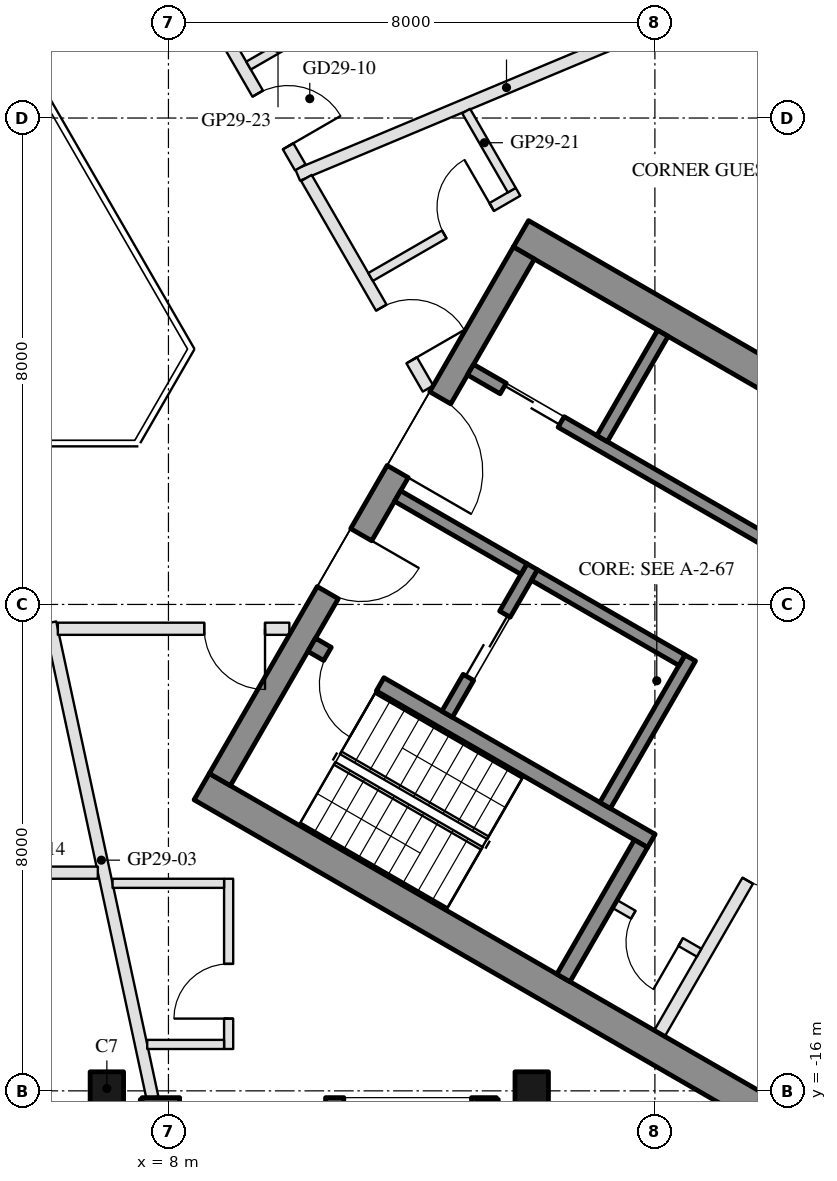
"""IFC4 building model, lengths in metres.
Left out: names, types, materials, properties, quantities, classifications, styles, units other than length and angle.
Written with IfcOpenShell. Run it as: python <this file> out.ifc"""

import sys

from ifc_helpers import new_model, si_unit, direction, frame, frame_2d, origin, origin_2d, place, context, subcontext, project, spatial, rectangle, hollow_rectangle, extrude, boolean, halfspace, element, fill, save


model = new_model("IFC4")
c1 = context("Model", 3, precision=1e-05, world=origin(), true_north=direction((0.0, 1.0)))
c2 = subcontext(c1, "Body", "Model", "MODEL_VIEW")
j1 = project(units=[si_unit("LENGTHUNIT", "METRE"), si_unit("PLANEANGLEUNIT", "RADIAN")], contexts=[c1])
p1 = place(None, origin())
s1 = spatial("IfcSite", under=j1, at=p1, CompositionType="ELEMENT")
p2 = place(p1, origin())
s2 = spatial("IfcBuilding", under=s1, at=p2, CompositionType="ELEMENT")
p3 = place(p2, frame((0.0, 0.0, 291.1)))
s3 = spatial("IfcBuildingStorey", under=s2, at=p3, CompositionType="ELEMENT", Elevation=291.1)
p4 = place(p3, frame((6.987, -15.962, 0.0), z_axis=(0.0, 0.0, 1.0), x_axis=(-1.0, 0.0, 0.0)))
e1 = element("IfcColumn", 1, at=p4, inside=s3, PredefinedType="COLUMN", context=c2, shape_type="SweptSolid", body=[
    boolean("DIFFERENCE", extrude(hollow_rectangle(XDim=0.55, YDim=0.55, WallThickness=0.025, at=origin_2d()), origin(), (0.0, 0.0, 1.0), 3.7), halfspace(frame((0.0, 0.0, 0.034), z_axis=(0.0, 0.0, 1.0), x_axis=(1.0, 0.0, 0.0)), True)),
])
p5 = place(p3, frame((13.974, -15.962, 0.0), z_axis=(0.0, 0.0, 1.0), x_axis=(-1.0, 0.0, 0.0)))
e2 = element("IfcColumn", 2, at=p5, inside=s3, PredefinedType="COLUMN", context=c2, shape_type="SweptSolid", body=[
    boolean("DIFFERENCE", extrude(hollow_rectangle(XDim=0.55, YDim=0.55, WallThickness=0.025, at=origin_2d()), origin(), (0.0, 0.0, 1.0), 3.7), halfspace(frame((0.0, 0.0, 0.04), z_axis=(0.0, 0.0, 1.0), x_axis=(1.0, 0.0, 0.0)), True)),
])
p6 = place(p3, frame((7.712, -17.362, 0.0), z_axis=(0.0, 0.0, 1.0), x_axis=(0.0, 1.0, 0.0)))
e3 = element("IfcWall", 3, at=p6, inside=s3, PredefinedType="SOLIDWALL", context=c2, shape_type="SweptSolid", body=[
    extrude(rectangle(XDim=1.22, YDim=0.35, at=frame_2d((0.61, 0.0))), origin(), (0.0, 0.0, 1.0), 3.55),
])
p7 = place(p3, frame((7.567, -16.287, 0.0), z_axis=(0.0, 0.0, 1.0), x_axis=(1.0, 0.0, 0.0)))
e4 = element("IfcWall", 4, at=p7, inside=s3, PredefinedType="SOLIDWALL", context=c2, shape_type="SweptSolid", body=[
    extrude(rectangle(XDim=5.827, YDim=0.35, at=frame_2d((2.914, 0.0))), origin(), (0.0, 0.0, 1.0), 3.55),
])
p8 = place(p7, frame((0.617, 0.0, 0.0)))
e5 = element("IfcOpeningElement", 5, at=p8, cuts=e4, PredefinedType="OPENING", context=c2, shape_type="SweptSolid", body=[
    extrude(rectangle(XDim=2.4, YDim=2.4, at=frame_2d((1.2, 1.2))), frame((0.0, 0.185, 0.0), z_axis=(0.0, -1.0, 0.0), x_axis=(1.0, 0.0, 0.0)), (0.0, 0.0, 1.0), 0.37),
])
p9 = place(p7, frame((3.317, 0.0, 0.3)))
e6 = element("IfcOpeningElement", 6, at=p9, cuts=e4, PredefinedType="OPENING", context=c2, shape_type="SweptSolid", body=[
    extrude(rectangle(XDim=2.1, YDim=2.65, at=frame_2d((1.05, 1.325))), frame((0.0, 0.185, 0.0), z_axis=(0.0, -1.0, 0.0), x_axis=(1.0, 0.0, 0.0)), (0.0, 0.0, 1.0), 0.37),
])
p10 = place(p3, frame((13.249, -16.142, 0.0), z_axis=(0.0, 0.0, 1.0), x_axis=(0.0, -1.0, 0.0)))
e7 = element("IfcWall", 7, at=p10, inside=s3, PredefinedType="SOLIDWALL", context=c2, shape_type="SweptSolid", body=[
    extrude(rectangle(XDim=1.22, YDim=0.35, at=frame_2d((0.61, 0.0))), origin(), (0.0, 0.0, 1.0), 3.55),
])
for number, where, z_axis, x_axis in (
    (8, (8.547, -10.997, 0.0), (0.0, 0.0, 1.0), (0.866, -0.5, 0.0)),
    (9, (13.797, -1.903, 0.0), (0.0, 0.0, 1.0), (0.866, -0.5, 0.0)),
):
    element("IfcWall", number, at=place(p3, frame(where, z_axis=z_axis, x_axis=x_axis)), inside=s3, PredefinedType="SHEAR", context=c2, shape_type="SweptSolid", body=[
        extrude(rectangle(XDim=11.222, YDim=0.5, at=frame_2d((5.611, 0.0))), origin(), (0.0, 0.0, 1.0), 3.5),
    ])
p11 = place(p3, frame((8.845, -10.88, 0.0), z_axis=(0.0, 0.0, 1.0), x_axis=(0.500004234368, 0.866022959057, 0.0)))
e10 = element("IfcWall", 10, at=p11, inside=s3, PredefinedType="SHEAR", context=c2, shape_type="SweptSolid", body=[
    extrude(rectangle(XDim=10.0, YDim=0.4, at=frame_2d((5.0, 0.0))), origin(), (0.0, 0.0, 1.0), 3.5),
])
p12 = place(p11, frame((3.55, 0.0, 0.0)))
e11 = element("IfcOpeningElement", 11, at=p12, cuts=e10, PredefinedType="OPENING", context=c2, shape_type="SweptSolid", body=[
    extrude(rectangle(XDim=1.1, YDim=2.1, at=frame_2d((0.55, 1.05))), frame((0.0, 0.21, 0.0), z_axis=(0.0, -1.0, 0.0), x_axis=(1.0, 0.0, 0.0)), (0.0, 0.0, 1.0), 0.42),
])
p13 = place(p11, frame((5.85, 0.0, 0.0)))
e12 = element("IfcOpeningElement", 12, at=p13, cuts=e10, PredefinedType="OPENING", context=c2, shape_type="SweptSolid", body=[
    extrude(rectangle(XDim=1.4, YDim=2.1, at=frame_2d((0.7, 1.05))), frame((0.0, 0.21, 0.0), z_axis=(0.0, -1.0, 0.0), x_axis=(1.0, 0.0, 0.0)), (0.0, 0.0, 1.0), 0.42),
])
p14 = place(p3, frame((10.356, -8.664, 0.0), z_axis=(0.0, 0.0, 1.0), x_axis=(0.866028629588, -0.499994412703, 0.0)))
e13 = element("IfcWall", 13, at=p14, inside=s3, PredefinedType="SHEAR", context=c2, shape_type="SweptSolid", body=[
    extrude(rectangle(XDim=6.45, YDim=0.25, at=frame_2d((3.225, 0.0))), origin(), (0.0, 0.0, 1.0), 3.5),
])
p15 = place(p14, frame((0.3, 0.0, 0.0)))
e14 = element("IfcOpeningElement", 14, at=p15, cuts=e13, PredefinedType="OPENING", context=c2, shape_type="SweptSolid", body=[
    extrude(rectangle(XDim=1.0, YDim=2.1, at=frame_2d((0.5, 1.05))), frame((0.0, 0.135, 0.0), z_axis=(0.0, -1.0, 0.0), x_axis=(1.0, 0.0, 0.0)), (0.0, 0.0, 1.0), 0.27),
])
p16 = place(p3, frame((14.496, -14.143, 0.0), z_axis=(0.0, 0.0, 1.0), x_axis=(0.500062241894, 0.865989465428, 0.0)))
e15 = element("IfcWall", 15, at=p16, inside=s3, PredefinedType="SHEAR", context=c2, shape_type="SweptSolid", body=[
    extrude(rectangle(XDim=2.55, YDim=0.25, at=frame_2d((1.275, 0.0))), origin(), (0.0, 0.0, 1.0), 3.5),
])
p17 = place(p3, frame((15.181, -11.305, 0.0), z_axis=(0.0, 0.0, 1.0), x_axis=(0.49994636267, 0.866056369097, 0.0)))
e16 = element("IfcWall", 16, at=p17, inside=s3, PredefinedType="SHEAR", context=c2, shape_type="SweptSolid", body=[
    extrude(rectangle(XDim=2.8, YDim=0.2, at=frame_2d((1.4, 0.0))), origin(), (0.0, 0.0, 1.0), 3.5),
])
p18 = place(p3, frame((12.583, -9.805, 0.0), z_axis=(0.0, 0.0, 1.0), x_axis=(0.49994636267, 0.866056369097, 0.0)))
e17 = element("IfcWall", 17, at=p18, inside=s3, PredefinedType="SHEAR", context=c2, shape_type="SweptSolid", body=[
    extrude(rectangle(XDim=2.8, YDim=0.2, at=frame_2d((1.4, 0.0))), origin(), (0.0, 0.0, 1.0), 3.5),
])
p19 = place(p18, frame((0.7, 0.0, 0.0)))
e18 = element("IfcOpeningElement", 18, at=p19, cuts=e17, PredefinedType="OPENING", context=c2, shape_type="SweptSolid", body=[
    extrude(rectangle(XDim=1.2, YDim=2.1, at=frame_2d((0.6, 1.05))), frame((0.0, 0.11, 0.0), z_axis=(0.0, -1.0, 0.0), x_axis=(1.0, 0.0, 0.0)), (0.0, 0.0, 1.0), 0.22),
])
p20 = place(p3, frame((11.768, -6.217, 0.0), z_axis=(0.0, 0.0, 1.0), x_axis=(0.866050077142, -0.499957262057, 0.0)))
e19 = element("IfcWall", 19, at=p20, inside=s3, PredefinedType="SHEAR", context=c2, shape_type="SweptSolid", body=[
    extrude(rectangle(XDim=2.4, YDim=0.2, at=frame_2d((1.2, 0.0))), origin(), (0.0, 0.0, 1.0), 3.5),
])
p21 = place(p3, frame((14.02, -7.517, 0.0), z_axis=(0.0, 0.0, 1.0), x_axis=(0.866034573852, -0.49998411664, 0.0)))
e20 = element("IfcWall", 20, at=p21, inside=s3, PredefinedType="SHEAR", context=c2, shape_type="SweptSolid", body=[
    extrude(rectangle(XDim=2.8, YDim=0.2, at=frame_2d((1.4, 0.0))), origin(), (0.0, 0.0, 1.0), 3.5),
])
p22 = place(p3, frame((12.968, -4.138, 0.0), z_axis=(0.0, 0.0, 1.0), x_axis=(0.866028328073, -0.49999493495, 0.0)))
e21 = element("IfcWall", 21, at=p22, inside=s3, PredefinedType="SHEAR", context=c2, shape_type="SweptSolid", body=[
    extrude(rectangle(XDim=10.16, YDim=0.2, at=frame_2d((5.08, 0.0))), origin(), (0.0, 0.0, 1.0), 3.5),
])
p23 = place(p22, frame((0.62, 0.0, 0.0)))
e22 = element("IfcOpeningElement", 22, at=p23, cuts=e21, PredefinedType="OPENING", context=c2, shape_type="SweptSolid", body=[
    extrude(rectangle(XDim=1.1, YDim=2.1, at=frame_2d((0.55, 1.05))), frame((0.0, 0.11, 0.0), z_axis=(0.0, -1.0, 0.0), x_axis=(1.0, 0.0, 0.0)), (0.0, 0.0, 1.0), 0.22),
])
p24 = place(p22, frame((5.8, 0.0, 0.0)))
e23 = element("IfcOpeningElement", 23, at=p24, cuts=e21, PredefinedType="OPENING", context=c2, shape_type="SweptSolid", body=[
    extrude(rectangle(XDim=0.9, YDim=2.1, at=frame_2d((0.45, 1.05))), frame((0.0, 0.11, 0.0), z_axis=(0.0, -1.0, 0.0), x_axis=(1.0, 0.0, 0.0)), (0.0, 0.0, 1.0), 0.22),
])
p25 = place(p3, frame((15.131, -5.272, 0.0), z_axis=(0.0, 0.0, 1.0), x_axis=(0.499972520799, 0.866041268327, 0.0)))
e24 = element("IfcWall", 24, at=p25, inside=s3, PredefinedType="SHEAR", context=c2, shape_type="SweptSolid", body=[
    extrude(rectangle(XDim=2.0, YDim=0.2, at=frame_2d((1.0, 0.0))), origin(), (0.0, 0.0, 1.0), 3.5),
])
p26 = place(p3, frame((16.076, -15.055, 0.0), z_axis=(0.0, 0.0, 1.0), x_axis=(0.499995103361, 0.866028230842, 0.0)))
e25 = element("IfcWall", 25, at=p26, inside=s3, PredefinedType="PARTITIONING", context=c2, shape_type="SweptSolid", body=[
    extrude(rectangle(XDim=5.4, YDim=0.2, at=frame_2d((2.7, 0.0))), origin(), (0.0, 0.0, 1.0), 3.5),
])
p27 = place(p26, frame((2.9, 0.0, 0.0)))
e26 = element("IfcOpeningElement", 26, at=p27, cuts=e25, PredefinedType="OPENING", context=c2, shape_type="SweptSolid", body=[
    extrude(rectangle(XDim=0.9, YDim=2.1, at=frame_2d((0.45, 1.05))), frame((0.0, 0.11, 0.0), z_axis=(0.0, -1.0, 0.0), x_axis=(1.0, 0.0, 0.0)), (0.0, 0.0, 1.0), 0.22),
])
p28 = place(p3, frame((15.342, -12.928, 0.0), z_axis=(0.0, 0.0, 1.0), x_axis=(0.865989903783, -0.500061482766, 0.0)))
e27 = element("IfcWall", 27, at=p28, inside=s3, PredefinedType="PARTITIONING", context=c2, shape_type="SweptSolid", body=[
    extrude(rectangle(XDim=1.6, YDim=0.15, at=frame_2d((0.8, 0.0))), origin(), (0.0, 0.0, 1.0), 3.5),
])
p29 = place(p28, frame((0.35, 0.0, 0.0)))
e28 = element("IfcOpeningElement", 28, at=p29, cuts=e27, PredefinedType="OPENING", context=c2, shape_type="SweptSolid", body=[
    extrude(rectangle(XDim=0.9, YDim=2.1, at=frame_2d((0.45, 1.05))), frame((0.0, 0.085, 0.0), z_axis=(0.0, -1.0, 0.0), x_axis=(1.0, 0.0, 0.0)), (0.0, 0.0, 1.0), 0.17),
])
p30 = place(p3, frame((7.737, -16.112, 0.0), z_axis=(0.0, 0.0, 1.0), x_axis=(-0.210221826162, 0.977653713646, 0.0)))
e29 = element("IfcWall", 29, at=p30, inside=s3, PredefinedType="PARTITIONING", context=c2, shape_type="SweptSolid", body=[
    extrude(rectangle(XDim=7.99, YDim=0.2, at=frame_2d((3.995, 0.0))), origin(), (0.0, 0.0, 1.0), 3.05),
])
p31 = place(p3, frame((16.994, 1.939, 0.0), z_axis=(0.0, 0.0, 1.0), x_axis=(-0.922394541425, -0.386249025824, 0.0)))
e30 = element("IfcWall", 30, at=p31, inside=s3, PredefinedType="PARTITIONING", context=c2, shape_type="SweptSolid", body=[
    extrude(rectangle(XDim=7.447, YDim=0.2, at=frame_2d((3.723, 0.0))), origin(), (0.0, 0.0, 1.0), 3.05),
])
p32 = place(p3, frame((6.839, -12.412, 0.0), z_axis=(0.0, 0.0, 1.0), x_axis=(-1.0, 0.0, 0.0)))
e31 = element("IfcWall", 31, at=p32, inside=s3, PredefinedType="PARTITIONING", context=c2, shape_type="SweptSolid", body=[
    extrude(rectangle(XDim=5.539, YDim=0.2, at=frame_2d((2.769, 0.0))), origin(), (0.0, 0.0, 1.0), 3.05),
])
p33 = place(p32, frame((2.269, 0.0, 0.0)))
e32 = element("IfcOpeningElement", 32, at=p33, cuts=e31, PredefinedType="OPENING", context=c2, shape_type="SweptSolid", body=[
    extrude(rectangle(XDim=1.0, YDim=2.1, at=frame_2d((0.5, 1.05))), frame((0.0, 0.11, 0.0), z_axis=(0.0, -1.0, 0.0), x_axis=(1.0, 0.0, 0.0)), (0.0, 0.0, 1.0), 0.22),
])
p34 = place(p3, frame((9.988, -8.4, 0.0), z_axis=(0.0, 0.0, 1.0), x_axis=(-1.0, 0.0, 0.0)))
e33 = element("IfcWall", 33, at=p34, inside=s3, PredefinedType="PARTITIONING", context=c2, shape_type="SweptSolid", body=[
    extrude(rectangle(XDim=3.807, YDim=0.2, at=frame_2d((1.904, 0.0))), origin(), (0.0, 0.0, 1.0), 3.05),
])
p35 = place(p34, frame((0.4, 0.0, 0.0)))
e34 = element("IfcOpeningElement", 34, at=p35, cuts=e33, PredefinedType="OPENING", context=c2, shape_type="SweptSolid", body=[
    extrude(rectangle(XDim=1.0, YDim=2.1, at=frame_2d((0.5, 1.05))), frame((0.0, 0.11, 0.0), z_axis=(0.0, -1.0, 0.0), x_axis=(1.0, 0.0, 0.0)), (0.0, 0.0, 1.0), 0.22),
])
p36 = place(p3, frame((8.99, -15.312, 0.0), z_axis=(0.0, 0.0, 1.0), x_axis=(0.0, 1.0, 0.0)))
e35 = element("IfcWall", 35, at=p36, inside=s3, PredefinedType="PARTITIONING", context=c2, shape_type="SweptSolid", body=[
    extrude(rectangle(XDim=2.8, YDim=0.15, at=frame_2d((1.4, 0.0))), origin(), (0.0, 0.0, 1.0), 3.55),
])
p37 = place(p36, frame((0.5, 0.0, 0.0)))
e36 = element("IfcOpeningElement", 36, at=p37, cuts=e35, PredefinedType="OPENING", context=c2, shape_type="SweptSolid", body=[
    extrude(rectangle(XDim=0.9, YDim=2.1, at=frame_2d((0.45, 1.05))), frame((0.0, 0.085, 0.0), z_axis=(0.0, -1.0, 0.0), x_axis=(1.0, 0.0, 0.0)), (0.0, 0.0, 1.0), 0.17),
])
p38 = place(p3, frame((7.651, -15.237, 0.0), z_axis=(0.0, 0.0, 1.0), x_axis=(1.0, 0.0, 0.0)))
e37 = element("IfcWall", 37, at=p38, inside=s3, PredefinedType="PARTITIONING", context=c2, shape_type="SweptSolid", body=[
    extrude(rectangle(XDim=1.264, YDim=0.15, at=frame_2d((0.632, 0.0))), origin(), (0.0, 0.0, 1.0), 3.55),
])
p39 = place(p3, frame((7.081, -12.587, 0.0), z_axis=(0.0, 0.0, 1.0), x_axis=(1.0, 0.0, 0.0)))
e38 = element("IfcWall", 38, at=p39, inside=s3, PredefinedType="PARTITIONING", context=c2, shape_type="SweptSolid", body=[
    extrude(rectangle(XDim=1.834, YDim=0.15, at=frame_2d((0.917, 0.0))), origin(), (0.0, 0.0, 1.0), 3.05),
])
p40 = place(p3, frame((10.269, -0.986, 0.0), z_axis=(0.0, 0.0, 1.0), x_axis=(0.50004472278, -0.865999581536, 0.0)))
e39 = element("IfcWall", 39, at=p40, inside=s3, PredefinedType="PARTITIONING", context=c2, shape_type="SweptSolid", body=[
    extrude(rectangle(XDim=4.0, YDim=0.2, at=frame_2d((2.0, 0.0))), origin(), (0.0, 0.0, 1.0), 3.05),
])
p41 = place(p40, frame((2.463, 0.0, 0.0)))
e40 = element("IfcOpeningElement", 40, at=p41, cuts=e39, PredefinedType="OPENING", context=c2, shape_type="SweptSolid", body=[
    extrude(rectangle(XDim=1.0, YDim=2.1, at=frame_2d((0.5, 1.05))), frame((0.0, 0.11, 0.0), z_axis=(0.0, -1.0, 0.0), x_axis=(1.0, 0.0, 0.0)), (0.0, 0.0, 1.0), 0.22),
])
p42 = place(p3, frame((11.324, -2.614, 0.0), z_axis=(0.0, 0.0, 1.0), x_axis=(0.866034573852, 0.49998411664, 0.0)))
e41 = element("IfcWall", 41, at=p42, inside=s3, PredefinedType="PARTITIONING", context=c2, shape_type="SweptSolid", body=[
    extrude(rectangle(XDim=2.8, YDim=0.15, at=frame_2d((1.4, 0.0))), origin(), (0.0, 0.0, 1.0), 3.55),
])
p43 = place(p42, frame((1.4, 0.0, 0.0)))
e42 = element("IfcOpeningElement", 42, at=p43, cuts=e41, PredefinedType="OPENING", context=c2, shape_type="SweptSolid", body=[
    extrude(rectangle(XDim=0.9, YDim=2.1, at=frame_2d((0.45, 1.05))), frame((0.0, 0.085, 0.0), z_axis=(0.0, -1.0, 0.0), x_axis=(1.0, 0.0, 0.0)), (0.0, 0.0, 1.0), 0.17),
])
p44 = place(p3, frame((13.646, -1.187, 0.0), z_axis=(0.0, 0.0, 1.0), x_axis=(-0.499985098601, 0.86603400694, 0.0)))
e43 = element("IfcWall", 43, at=p44, inside=s3, PredefinedType="PARTITIONING", context=c2, shape_type="SweptSolid", body=[
    extrude(rectangle(XDim=1.502, YDim=0.15, at=frame_2d((0.751, 0.0))), origin(), (0.0, 0.0, 1.0), 3.05),
])
p45 = place(p3, frame((8.325, 2.381, 0.0), z_axis=(0.0, 0.0, 1.0), x_axis=(0.499949858301, -0.866054351173, 0.0)))
e44 = element("IfcWall", 44, at=p45, inside=s3, PredefinedType="PARTITIONING", context=c2, shape_type="SweptSolid", body=[
    extrude(rectangle(XDim=3.687, YDim=0.2, at=frame_2d((1.843, 0.0))), origin(), (0.0, 0.0, 1.0), 3.05),
])
p46 = place(p45, frame((2.286, 0.0, 0.0)))
e45 = element("IfcOpeningElement", 45, at=p46, cuts=e44, PredefinedType="OPENING", context=c2, shape_type="SweptSolid", body=[
    extrude(rectangle(XDim=1.0, YDim=2.1, at=frame_2d((0.5, 1.05))), frame((0.0, 0.11, 0.0), z_axis=(0.0, -1.0, 0.0), x_axis=(1.0, 0.0, 0.0)), (0.0, 0.0, 1.0), 0.22),
])
p47 = place(p3, frame((9.317, 0.863, 0.0), z_axis=(0.0, 0.0, 1.0), x_axis=(0.865996816683, 0.500049511043, 0.0)))
e46 = element("IfcWall", 46, at=p47, inside=s3, PredefinedType="PARTITIONING", context=c2, shape_type="SweptSolid", body=[
    extrude(rectangle(XDim=2.8, YDim=0.15, at=frame_2d((1.4, 0.0))), origin(), (0.0, 0.0, 1.0), 3.55),
])
p48 = place(p47, frame((1.4, 0.0, 0.0)))
e47 = element("IfcOpeningElement", 47, at=p48, cuts=e46, PredefinedType="OPENING", context=c2, shape_type="SweptSolid", body=[
    extrude(rectangle(XDim=0.9, YDim=2.1, at=frame_2d((0.45, 1.05))), frame((0.0, 0.085, 0.0), z_axis=(0.0, -1.0, 0.0), x_axis=(1.0, 0.0, 0.0)), (0.0, 0.0, 1.0), 0.17),
])
p49 = place(p19, origin())
e48 = element("IfcDoor", 48, at=p49, inside=s3, OperationType="DOUBLE_DOOR_SLIDING", PredefinedType="DOOR", context=c2, shape_type="SweptSolid", body=[
    extrude(rectangle(XDim=1.2, YDim=2.1, at=frame_2d((0.6, 1.05))), frame((0.0, 0.025, 0.0), z_axis=(0.0, -1.0, 0.0), x_axis=(1.0, 0.0, 0.0)), (0.0, 0.0, 1.0), 0.05),
])
fill(e18, e48)
p50 = place(p29, frame((0.9, 0.0, 0.0), z_axis=(0.0, 0.0, 1.0), x_axis=(-1.0, 0.0, 0.0)))
e49 = element("IfcDoor", 49, at=p50, inside=s3, OperationType="SINGLE_SWING_LEFT", PredefinedType="DOOR", context=c2, shape_type="SweptSolid", body=[
    extrude(rectangle(XDim=0.9, YDim=2.1, at=frame_2d((0.45, 1.05))), frame((0.0, 0.025, 0.0), z_axis=(0.0, -1.0, 0.0), x_axis=(1.0, 0.0, 0.0)), (0.0, 0.0, 1.0), 0.05),
])
fill(e28, e49)
p51 = place(p23, origin())
e50 = element("IfcDoor", 50, at=p51, inside=s3, OperationType="DOUBLE_DOOR_SLIDING", PredefinedType="DOOR", context=c2, shape_type="SweptSolid", body=[
    extrude(rectangle(XDim=1.1, YDim=2.1, at=frame_2d((0.55, 1.05))), frame((0.0, 0.025, 0.0), z_axis=(0.0, -1.0, 0.0), x_axis=(1.0, 0.0, 0.0)), (0.0, 0.0, 1.0), 0.05),
])
fill(e22, e50)
p52 = place(p27, frame((0.9, 0.0, 0.0), z_axis=(0.0, 0.0, 1.0), x_axis=(-1.0, 0.0, 0.0)))
e51 = element("IfcDoor", 51, at=p52, inside=s3, OperationType="SINGLE_SWING_LEFT", PredefinedType="DOOR", context=c2, shape_type="SweptSolid", body=[
    extrude(rectangle(XDim=0.9, YDim=2.1, at=frame_2d((0.45, 1.05))), frame((0.0, 0.025, 0.0), z_axis=(0.0, -1.0, 0.0), x_axis=(1.0, 0.0, 0.0)), (0.0, 0.0, 1.0), 0.05),
])
fill(e26, e51)
p53 = place(p12, frame((1.1, 0.0, 0.0), z_axis=(0.0, 0.0, 1.0), x_axis=(-1.0, 0.0, 0.0)))
e52 = element("IfcDoor", 52, at=p53, inside=s3, OperationType="SINGLE_SWING_LEFT", PredefinedType="DOOR", context=c2, shape_type="SweptSolid", body=[
    extrude(rectangle(XDim=1.1, YDim=2.1, at=frame_2d((0.55, 1.05))), frame((0.0, 0.025, 0.0), z_axis=(0.0, -1.0, 0.0), x_axis=(1.0, 0.0, 0.0)), (0.0, 0.0, 1.0), 0.05),
])
fill(e11, e52)
p54 = place(p13, frame((1.4, 0.0, 0.0), z_axis=(0.0, 0.0, 1.0), x_axis=(-1.0, 0.0, 0.0)))
e53 = element("IfcDoor", 53, at=p54, inside=s3, OperationType="DOUBLE_DOOR_SINGLE_SWING", PredefinedType="DOOR", context=c2, shape_type="SweptSolid", body=[
    extrude(rectangle(XDim=1.4, YDim=2.1, at=frame_2d((0.7, 1.05))), frame((0.0, 0.025, 0.0), z_axis=(0.0, -1.0, 0.0), x_axis=(1.0, 0.0, 0.0)), (0.0, 0.0, 1.0), 0.05),
])
fill(e12, e53)
p55 = place(p15, frame((1.0, 0.0, 0.0), z_axis=(0.0, 0.0, 1.0), x_axis=(-1.0, 0.0, 0.0)))
e54 = element("IfcDoor", 54, at=p55, inside=s3, OperationType="SINGLE_SWING_LEFT", PredefinedType="DOOR", context=c2, shape_type="SweptSolid", body=[
    extrude(rectangle(XDim=1.0, YDim=2.1, at=frame_2d((0.5, 1.05))), frame((0.0, 0.025, 0.0), z_axis=(0.0, -1.0, 0.0), x_axis=(1.0, 0.0, 0.0)), (0.0, 0.0, 1.0), 0.05),
])
fill(e14, e54)
p56 = place(p37, origin())
e55 = element("IfcDoor", 55, at=p56, inside=s3, OperationType="SINGLE_SWING_LEFT", PredefinedType="DOOR", context=c2, shape_type="SweptSolid", body=[
    extrude(rectangle(XDim=0.9, YDim=2.1, at=frame_2d((0.45, 1.05))), frame((0.0, 0.025, 0.0), z_axis=(0.0, -1.0, 0.0), x_axis=(1.0, 0.0, 0.0)), (0.0, 0.0, 1.0), 0.05),
])
fill(e36, e55)
p57 = place(p35, origin())
e56 = element("IfcDoor", 56, at=p57, inside=s3, OperationType="SINGLE_SWING_LEFT", PredefinedType="DOOR", context=c2, shape_type="SweptSolid", body=[
    extrude(rectangle(XDim=1.0, YDim=2.1, at=frame_2d((0.5, 1.05))), frame((0.0, 0.025, 0.0), z_axis=(0.0, -1.0, 0.0), x_axis=(1.0, 0.0, 0.0)), (0.0, 0.0, 1.0), 0.05),
])
fill(e34, e56)
p58 = place(p43, origin())
e57 = element("IfcDoor", 57, at=p58, inside=s3, OperationType="SINGLE_SWING_RIGHT", PredefinedType="DOOR", context=c2, shape_type="SweptSolid", body=[
    extrude(rectangle(XDim=0.9, YDim=2.1, at=frame_2d((0.45, 1.05))), frame((0.0, 0.025, 0.0), z_axis=(0.0, -1.0, 0.0), x_axis=(1.0, 0.0, 0.0)), (0.0, 0.0, 1.0), 0.05),
])
fill(e42, e57)
p59 = place(p41, origin())
e58 = element("IfcDoor", 58, at=p59, inside=s3, OperationType="SINGLE_SWING_RIGHT", PredefinedType="DOOR", context=c2, shape_type="SweptSolid", body=[
    extrude(rectangle(XDim=1.0, YDim=2.1, at=frame_2d((0.5, 1.05))), frame((0.0, 0.025, 0.0), z_axis=(0.0, -1.0, 0.0), x_axis=(1.0, 0.0, 0.0)), (0.0, 0.0, 1.0), 0.05),
])
fill(e40, e58)
p60 = place(p46, origin())
e59 = element("IfcDoor", 59, at=p60, inside=s3, OperationType="SINGLE_SWING_RIGHT", PredefinedType="DOOR", context=c2, shape_type="SweptSolid", body=[
    extrude(rectangle(XDim=1.0, YDim=2.1, at=frame_2d((0.5, 1.05))), frame((0.0, 0.025, 0.0), z_axis=(0.0, -1.0, 0.0), x_axis=(1.0, 0.0, 0.0)), (0.0, 0.0, 1.0), 0.05),
])
fill(e45, e59)
save(model, sys.argv[1])
